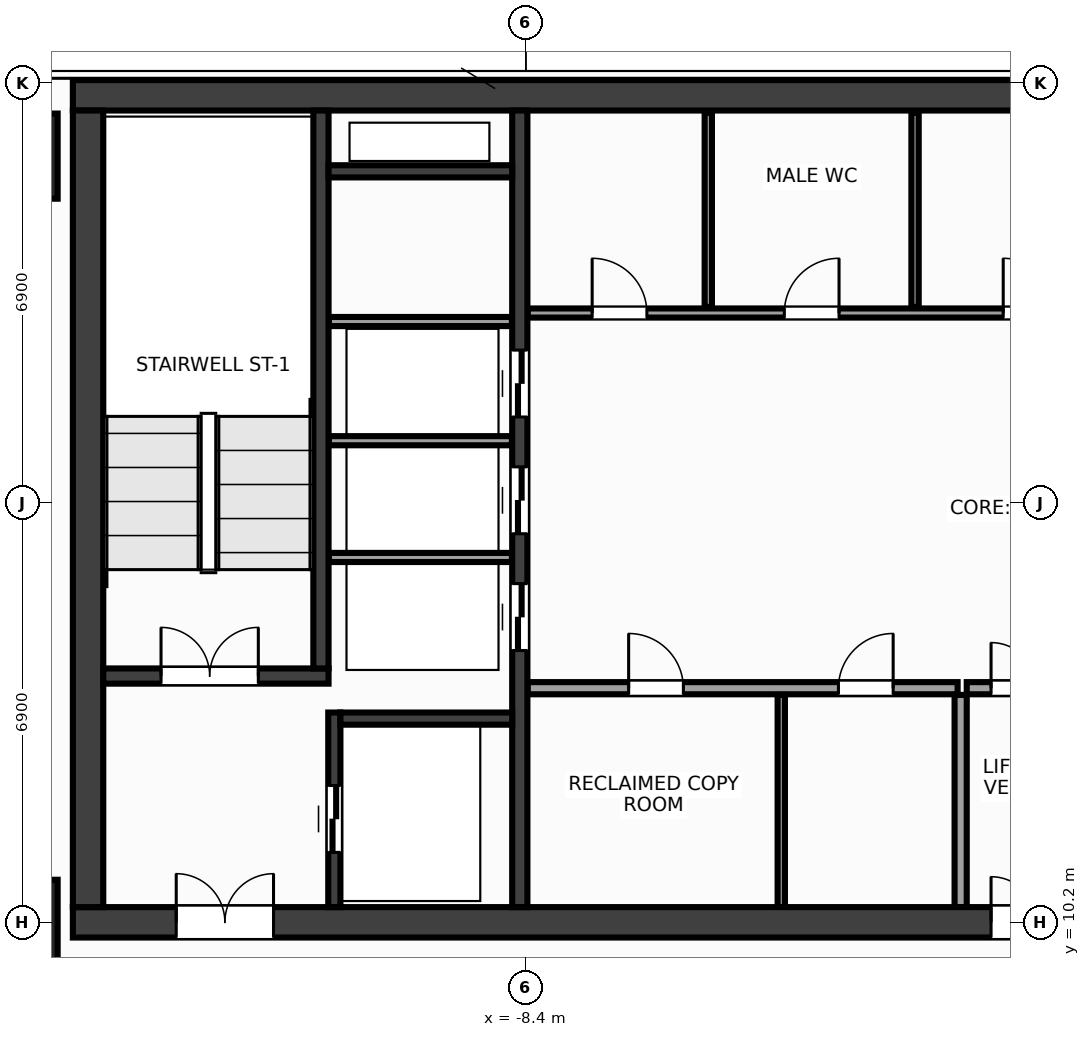
"""IFC4 building model, lengths in metres.
Left out: names, types, materials, properties, quantities, classifications, styles, units other than length and angle.
Written with IfcOpenShell. Run it as: python <this file> out.ifc"""

import sys

from ifc_helpers import new_model, si_unit, direction, frame, frame_2d, origin, origin_2d, place, context, subcontext, project, spatial, rectangle, extrude, source, transform, mapped, element, fill, save


model = new_model("IFC4")
c1 = context("Model", 3, precision=1e-05, world=origin(), true_north=direction((0.0, 1.0)))
c2 = subcontext(c1, "Body", "Model", "MODEL_VIEW")
j1 = project(units=[si_unit("LENGTHUNIT", "METRE"), si_unit("PLANEANGLEUNIT", "RADIAN")], contexts=[c1])
p1 = place(None, origin())
s1 = spatial("IfcSite", under=j1, at=p1, CompositionType="ELEMENT")
p2 = place(p1, origin())
s2 = spatial("IfcBuilding", under=s1, at=p2, CompositionType="ELEMENT")
p3 = place(p2, frame((0.0, 0.0, 236.0)))
s3 = spatial("IfcBuildingStorey", under=s2, at=p3, CompositionType="ELEMENT", Elevation=236.0)
m1 = source(origin(), c2, "Body", "SweptSolid", [
    extrude(rectangle(XDim=31.7, YDim=0.5, at=frame_2d((15.85, 0.0))), origin(), (0.0, 0.0, 1.0), 3.6),
])
p4 = place(p3, frame((-15.85, 23.8, 0.0), z_axis=(0.0, 0.0, 1.0), x_axis=(1.0, 0.0, 0.0)))
e1 = element("IfcWall", 1, at=p4, inside=s3, PredefinedType="SHEAR", context=c2, shape_type="MappedRepresentation", body=[
    mapped(m1, transform((0.0, 0.0, 0.0), x_axis=(1.0, 0.0, 0.0), y_axis=(0.0, 1.0, 0.0), z_axis=(0.0, 0.0, 1.0), scale=1.0)),
])
p5 = place(p3, frame((-15.85, 10.2, 0.0), z_axis=(0.0, 0.0, 1.0), x_axis=(1.0, 0.0, 0.0)))
e2 = element("IfcWall", 2, at=p5, inside=s3, PredefinedType="SHEAR", context=c2, shape_type="MappedRepresentation", body=[
    mapped(m1, transform((0.0, 0.0, 0.0), x_axis=(1.0, 0.0, 0.0), y_axis=(0.0, 1.0, 0.0), z_axis=(0.0, 0.0, 1.0), scale=1.0)),
])
p6 = place(p5, frame((1.7, 0.0, 0.0)))
e3 = element("IfcOpeningElement", 3, at=p6, cuts=e2, PredefinedType="OPENING", context=c2, shape_type="SweptSolid", body=[
    extrude(rectangle(XDim=1.6, YDim=2.15, at=frame_2d((0.8, 1.075))), frame((0.0, 0.262, 0.0), z_axis=(0.0, -1.0, 0.0), x_axis=(1.0, 0.0, 0.0)), (0.0, 0.0, 1.0), 0.524),
])
p7 = place(p5, frame((28.4, 0.0, 0.0)))
e4 = element("IfcOpeningElement", 4, at=p7, cuts=e2, PredefinedType="OPENING", context=c2, shape_type="SweptSolid", body=[
    extrude(rectangle(XDim=1.6, YDim=2.15, at=frame_2d((0.8, 1.075))), frame((0.0, 0.262, 0.0), z_axis=(0.0, -1.0, 0.0), x_axis=(1.0, 0.0, 0.0)), (0.0, 0.0, 1.0), 0.524),
])
p8 = place(p5, frame((15.1, 0.0, 0.0)))
e5 = element("IfcOpeningElement", 5, at=p8, cuts=e2, PredefinedType="OPENING", context=c2, shape_type="SweptSolid", body=[
    extrude(rectangle(XDim=1.5, YDim=2.2, at=frame_2d((0.75, 1.1))), frame((0.0, 0.262, 0.0), z_axis=(0.0, -1.0, 0.0), x_axis=(1.0, 0.0, 0.0)), (0.0, 0.0, 1.0), 0.524),
])
m2 = source(origin(), c2, "Body", "SweptSolid", [
    extrude(rectangle(XDim=13.1, YDim=0.5, at=frame_2d((6.55, 0.0))), origin(), (0.0, 0.0, 1.0), 3.6),
])
p9 = place(p3, frame((-15.6, 10.45, 0.0), z_axis=(0.0, 0.0, 1.0), x_axis=(0.0, 1.0, 0.0)))
e6 = element("IfcWall", 6, at=p9, inside=s3, PredefinedType="SHEAR", context=c2, shape_type="MappedRepresentation", body=[
    mapped(m2, transform((0.0, 0.0, 0.0), x_axis=(1.0, 0.0, 0.0), y_axis=(0.0, 1.0, 0.0), z_axis=(0.0, 0.0, 1.0), scale=1.0)),
])
m3 = source(origin(), c2, "Body", "SweptSolid", [
    extrude(rectangle(XDim=13.1, YDim=0.25, at=frame_2d((6.55, 0.0))), origin(), (0.0, 0.0, 1.0), 3.6),
])
p10 = place(p3, frame((-8.5, 10.45, 0.0), z_axis=(0.0, 0.0, 1.0), x_axis=(0.0, 1.0, 0.0)))
e7 = element("IfcWall", 7, at=p10, inside=s3, PredefinedType="SHEAR", context=c2, shape_type="MappedRepresentation", body=[
    mapped(m3, transform((0.0, 0.0, 0.0), x_axis=(1.0, 0.0, 0.0), y_axis=(0.0, 1.0, 0.0), z_axis=(0.0, 0.0, 1.0), scale=1.0)),
])
p11 = place(p10, frame((4.22, 0.0, 0.0)))
e8 = element("IfcOpeningElement", 8, at=p11, cuts=e7, PredefinedType="OPENING", context=c2, shape_type="SweptSolid", body=[
    extrude(rectangle(XDim=1.1, YDim=2.15, at=frame_2d((0.55, 1.075))), frame((0.0, 0.137, 0.0), z_axis=(0.0, -1.0, 0.0), x_axis=(1.0, 0.0, 0.0)), (0.0, 0.0, 1.0), 0.274),
])
p12 = place(p10, frame((6.14, 0.0, 0.0)))
e9 = element("IfcOpeningElement", 9, at=p12, cuts=e7, PredefinedType="OPENING", context=c2, shape_type="SweptSolid", body=[
    extrude(rectangle(XDim=1.1, YDim=2.15, at=frame_2d((0.55, 1.075))), frame((0.0, 0.137, 0.0), z_axis=(0.0, -1.0, 0.0), x_axis=(1.0, 0.0, 0.0)), (0.0, 0.0, 1.0), 0.274),
])
p13 = place(p10, frame((8.06, 0.0, 0.0)))
e10 = element("IfcOpeningElement", 10, at=p13, cuts=e7, PredefinedType="OPENING", context=c2, shape_type="SweptSolid", body=[
    extrude(rectangle(XDim=1.1, YDim=2.15, at=frame_2d((0.55, 1.075))), frame((0.0, 0.137, 0.0), z_axis=(0.0, -1.0, 0.0), x_axis=(1.0, 0.0, 0.0)), (0.0, 0.0, 1.0), 0.274),
])
m4 = source(origin(), c2, "Body", "SweptSolid", [
    extrude(rectangle(XDim=3.705, YDim=0.25, at=frame_2d((1.853, 0.0))), origin(), (0.0, 0.0, 1.0), 3.6),
])
p14 = place(p3, frame((-15.35, 14.25, 0.0), z_axis=(0.0, 0.0, 1.0), x_axis=(1.0, 0.0, 0.0)))
e11 = element("IfcWall", 11, at=p14, inside=s3, PredefinedType="SHEAR", context=c2, shape_type="MappedRepresentation", body=[
    mapped(m4, transform((0.0, 0.0, 0.0), x_axis=(1.0, 0.0, 0.0), y_axis=(0.0, 1.0, 0.0), z_axis=(0.0, 0.0, 1.0), scale=1.0)),
])
p15 = place(p14, frame((0.95, 0.0, 0.0)))
e12 = element("IfcOpeningElement", 12, at=p15, cuts=e11, PredefinedType="OPENING", context=c2, shape_type="SweptSolid", body=[
    extrude(rectangle(XDim=1.6, YDim=2.15, at=frame_2d((0.8, 1.075))), frame((0.0, 0.137, 0.0), z_axis=(0.0, -1.0, 0.0), x_axis=(1.0, 0.0, 0.0)), (0.0, 0.0, 1.0), 0.274),
])
m5 = source(origin(), c2, "Body", "SweptSolid", [
    extrude(rectangle(XDim=9.175, YDim=0.25, at=frame_2d((4.587, 0.0))), origin(), (0.0, 0.0, 1.0), 3.6),
])
p16 = place(p3, frame((-11.77, 14.375, 0.0), z_axis=(0.0, 0.0, 1.0), x_axis=(0.0, 1.0, 0.0)))
e13 = element("IfcWall", 13, at=p16, inside=s3, PredefinedType="SHEAR", context=c2, shape_type="MappedRepresentation", body=[
    mapped(m5, transform((0.0, 0.0, 0.0), x_axis=(1.0, 0.0, 0.0), y_axis=(0.0, 1.0, 0.0), z_axis=(0.0, 0.0, 1.0), scale=1.0)),
])
m6 = source(origin(), c2, "Body", "SweptSolid", [
    extrude(rectangle(XDim=3.2, YDim=0.2, at=frame_2d((1.6, 0.0))), origin(), (0.0, 0.0, 1.0), 3.6),
])
p17 = place(p3, frame((-11.55, 10.45, 0.0), z_axis=(0.0, 0.0, 1.0), x_axis=(0.0, 1.0, 0.0)))
e14 = element("IfcWall", 14, at=p17, inside=s3, PredefinedType="SHEAR", context=c2, shape_type="MappedRepresentation", body=[
    mapped(m6, transform((0.0, 0.0, 0.0), x_axis=(1.0, 0.0, 0.0), y_axis=(0.0, 1.0, 0.0), z_axis=(0.0, 0.0, 1.0), scale=1.0)),
])
p18 = place(p17, frame((0.9, 0.0, 0.0)))
e15 = element("IfcOpeningElement", 15, at=p18, cuts=e14, PredefinedType="OPENING", context=c2, shape_type="SweptSolid", body=[
    extrude(rectangle(XDim=1.1, YDim=2.15, at=frame_2d((0.55, 1.075))), frame((0.0, 0.112, 0.0), z_axis=(0.0, -1.0, 0.0), x_axis=(1.0, 0.0, 0.0)), (0.0, 0.0, 1.0), 0.224),
])
m7 = source(origin(), c2, "Body", "SweptSolid", [
    extrude(rectangle(XDim=2.825, YDim=0.2, at=frame_2d((1.413, 0.0))), origin(), (0.0, 0.0, 1.0), 3.6),
])
p19 = place(p3, frame((-11.45, 13.55, 0.0), z_axis=(0.0, 0.0, 1.0), x_axis=(1.0, 0.0, 0.0)))
e16 = element("IfcWall", 16, at=p19, inside=s3, PredefinedType="SHEAR", context=c2, shape_type="MappedRepresentation", body=[
    mapped(m7, transform((0.0, 0.0, 0.0), x_axis=(1.0, 0.0, 0.0), y_axis=(0.0, 1.0, 0.0), z_axis=(0.0, 0.0, 1.0), scale=1.0)),
])
m8 = source(origin(), c2, "Body", "SweptSolid", [
    extrude(rectangle(XDim=3.02, YDim=0.2, at=frame_2d((1.51, 0.0))), origin(), (0.0, 0.0, 1.0), 3.6),
])
p20 = place(p3, frame((-11.645, 22.55, 0.0), z_axis=(0.0, 0.0, 1.0), x_axis=(1.0, 0.0, 0.0)))
e17 = element("IfcWall", 17, at=p20, inside=s3, PredefinedType="SHEAR", context=c2, shape_type="MappedRepresentation", body=[
    mapped(m8, transform((0.0, 0.0, 0.0), x_axis=(1.0, 0.0, 0.0), y_axis=(0.0, 1.0, 0.0), z_axis=(0.0, 0.0, 1.0), scale=1.0)),
])
m9 = source(origin(), c2, "Body", "SweptSolid", [
    extrude(rectangle(XDim=1.4, YDim=1.4, at=origin_2d()), origin(), (0.0, 0.0, 1.0), 3.6),
])
for number, where, z_axis, x_axis in (
    (18, (-16.8, 10.2, 0.0), (0.0, 0.0, 1.0), (1.0, 0.0, 0.0)),
    (19, (-16.8, 22.8, 0.0), (0.0, 0.0, 1.0), (1.0, 0.0, 0.0)),
):
    element("IfcColumn", number, at=place(p3, frame(where, z_axis=z_axis, x_axis=x_axis)), inside=s3, PredefinedType="COLUMN", context=c2, shape_type="MappedRepresentation", body=[
        mapped(m9, transform((0.0, 0.0, 0.0), x_axis=(1.0, 0.0, 0.0), y_axis=(0.0, 1.0, 0.0), z_axis=(0.0, 0.0, 1.0), scale=1.0)),
    ])
m10 = source(origin(), c2, "Body", "SweptSolid", [
    extrude(rectangle(XDim=3.01, YDim=0.15, at=frame_2d((1.505, 0.0))), origin(), (0.0, 0.0, 1.0), 3.37),
])
for number, where, z_axis, x_axis in (
    (20, (-11.64, 16.2, 0.0), (0.0, 0.0, 1.0), (1.0, 0.0, 0.0)),
    (21, (-11.64, 18.12, 0.0), (0.0, 0.0, 1.0), (1.0, 0.0, 0.0)),
    (22, (-11.64, 20.08, 0.0), (0.0, 0.0, 1.0), (1.0, 0.0, 0.0)),
):
    element("IfcWall", number, at=place(p3, frame(where, z_axis=z_axis, x_axis=x_axis)), inside=s3, PredefinedType="PARTITIONING", context=c2, shape_type="MappedRepresentation", body=[
        mapped(m10, transform((0.0, 0.0, 0.0), x_axis=(1.0, 0.0, 0.0), y_axis=(0.0, 1.0, 0.0), z_axis=(0.0, 0.0, 1.0), scale=1.0)),
    ])
m11 = source(origin(), c2, "Body", "SweptSolid", [
    extrude(rectangle(XDim=7.07, YDim=0.2, at=frame_2d((3.535, 0.0))), origin(), (0.0, 0.0, 1.0), 3.37),
])
p21 = place(p3, frame((-8.37, 14.05, 0.0), z_axis=(0.0, 0.0, 1.0), x_axis=(1.0, 0.0, 0.0)))
e23 = element("IfcWall", 23, at=p21, inside=s3, PredefinedType="PARTITIONING", context=c2, shape_type="MappedRepresentation", body=[
    mapped(m11, transform((0.0, 0.0, 0.0), x_axis=(1.0, 0.0, 0.0), y_axis=(0.0, 1.0, 0.0), z_axis=(0.0, 0.0, 1.0), scale=1.0)),
])
p22 = place(p21, frame((1.66, 0.0, 0.0)))
e24 = element("IfcOpeningElement", 24, at=p22, cuts=e23, PredefinedType="OPENING", context=c2, shape_type="SweptSolid", body=[
    extrude(rectangle(XDim=0.9, YDim=2.15, at=frame_2d((0.45, 1.075))), frame((0.0, 0.112, 0.0), z_axis=(0.0, -1.0, 0.0), x_axis=(1.0, 0.0, 0.0)), (0.0, 0.0, 1.0), 0.224),
])
p23 = place(p21, frame((5.11, 0.0, 0.0)))
e25 = element("IfcOpeningElement", 25, at=p23, cuts=e23, PredefinedType="OPENING", context=c2, shape_type="SweptSolid", body=[
    extrude(rectangle(XDim=0.9, YDim=2.15, at=frame_2d((0.45, 1.075))), frame((0.0, 0.112, 0.0), z_axis=(0.0, -1.0, 0.0), x_axis=(1.0, 0.0, 0.0)), (0.0, 0.0, 1.0), 0.224),
])
m12 = source(origin(), c2, "Body", "SweptSolid", [
    extrude(rectangle(XDim=3.49, YDim=0.2, at=frame_2d((1.745, 0.0))), origin(), (0.0, 0.0, 1.0), 3.37),
])
p24 = place(p3, frame((-1.25, 10.45, 0.0), z_axis=(0.0, 0.0, 1.0), x_axis=(0.0, 1.0, 0.0)))
e26 = element("IfcWall", 26, at=p24, inside=s3, PredefinedType="PARTITIONING", context=c2, shape_type="MappedRepresentation", body=[
    mapped(m12, transform((0.0, 0.0, 0.0), x_axis=(1.0, 0.0, 0.0), y_axis=(0.0, 1.0, 0.0), z_axis=(0.0, 0.0, 1.0), scale=1.0)),
])
m13 = source(origin(), c2, "Body", "SweptSolid", [
    extrude(rectangle(XDim=2.3, YDim=0.2, at=frame_2d((1.15, 0.0))), origin(), (0.0, 0.0, 1.0), 3.37),
])
p25 = place(p3, frame((-1.15, 14.05, 0.0), z_axis=(0.0, 0.0, 1.0), x_axis=(1.0, 0.0, 0.0)))
e27 = element("IfcWall", 27, at=p25, inside=s3, PredefinedType="PARTITIONING", context=c2, shape_type="MappedRepresentation", body=[
    mapped(m13, transform((0.0, 0.0, 0.0), x_axis=(1.0, 0.0, 0.0), y_axis=(0.0, 1.0, 0.0), z_axis=(0.0, 0.0, 1.0), scale=1.0)),
])
p26 = place(p25, frame((0.4, 0.0, 0.0)))
e28 = element("IfcOpeningElement", 28, at=p26, cuts=e27, PredefinedType="OPENING", context=c2, shape_type="SweptSolid", body=[
    extrude(rectangle(XDim=1.5, YDim=2.2, at=frame_2d((0.75, 1.1))), frame((0.0, 0.112, 0.0), z_axis=(0.0, -1.0, 0.0), x_axis=(1.0, 0.0, 0.0)), (0.0, 0.0, 1.0), 0.224),
])
m14 = source(origin(), c2, "Body", "SweptSolid", [
    extrude(rectangle(XDim=14.59, YDim=0.15, at=frame_2d((7.295, 0.0))), origin(), (0.0, 0.0, 1.0), 3.37),
])
p27 = place(p3, frame((-8.37, 20.22, 0.0), z_axis=(0.0, 0.0, 1.0), x_axis=(1.0, 0.0, 0.0)))
e29 = element("IfcWall", 29, at=p27, inside=s3, PredefinedType="PARTITIONING", context=c2, shape_type="MappedRepresentation", body=[
    mapped(m14, transform((0.0, 0.0, 0.0), x_axis=(1.0, 0.0, 0.0), y_axis=(0.0, 1.0, 0.0), z_axis=(0.0, 0.0, 1.0), scale=1.0)),
])
p28 = place(p27, frame((1.06, 0.0, 0.0)))
e30 = element("IfcOpeningElement", 30, at=p28, cuts=e29, PredefinedType="OPENING", context=c2, shape_type="SweptSolid", body=[
    extrude(rectangle(XDim=0.9, YDim=2.15, at=frame_2d((0.45, 1.075))), frame((0.0, 0.087, 0.0), z_axis=(0.0, -1.0, 0.0), x_axis=(1.0, 0.0, 0.0)), (0.0, 0.0, 1.0), 0.174),
])
p29 = place(p27, frame((4.22, 0.0, 0.0)))
e31 = element("IfcOpeningElement", 31, at=p29, cuts=e29, PredefinedType="OPENING", context=c2, shape_type="SweptSolid", body=[
    extrude(rectangle(XDim=0.9, YDim=2.15, at=frame_2d((0.45, 1.075))), frame((0.0, 0.087, 0.0), z_axis=(0.0, -1.0, 0.0), x_axis=(1.0, 0.0, 0.0)), (0.0, 0.0, 1.0), 0.174),
])
p30 = place(p27, frame((7.82, 0.0, 0.0)))
e32 = element("IfcOpeningElement", 32, at=p30, cuts=e29, PredefinedType="OPENING", context=c2, shape_type="SweptSolid", body=[
    extrude(rectangle(XDim=0.9, YDim=2.15, at=frame_2d((0.45, 1.075))), frame((0.0, 0.087, 0.0), z_axis=(0.0, -1.0, 0.0), x_axis=(1.0, 0.0, 0.0)), (0.0, 0.0, 1.0), 0.174),
])
p31 = place(p27, frame((11.87, 0.0, 0.0)))
e33 = element("IfcOpeningElement", 33, at=p31, cuts=e29, PredefinedType="OPENING", context=c2, shape_type="SweptSolid", body=[
    extrude(rectangle(XDim=0.9, YDim=2.15, at=frame_2d((0.45, 1.075))), frame((0.0, 0.087, 0.0), z_axis=(0.0, -1.0, 0.0), x_axis=(1.0, 0.0, 0.0)), (0.0, 0.0, 1.0), 0.174),
])
m15 = source(origin(), c2, "Body", "SweptSolid", [
    extrude(rectangle(XDim=3.49, YDim=0.12, at=frame_2d((1.745, 0.0))), origin(), (0.0, 0.0, 1.0), 3.37),
])
p32 = place(p3, frame((-4.2, 10.45, 0.0), z_axis=(0.0, 0.0, 1.0), x_axis=(0.0, 1.0, 0.0)))
e34 = element("IfcWall", 34, at=p32, inside=s3, PredefinedType="PARTITIONING", context=c2, shape_type="MappedRepresentation", body=[
    mapped(m15, transform((0.0, 0.0, 0.0), x_axis=(1.0, 0.0, 0.0), y_axis=(0.0, 1.0, 0.0), z_axis=(0.0, 0.0, 1.0), scale=1.0)),
])
m16 = source(origin(), c2, "Body", "SweptSolid", [
    extrude(rectangle(XDim=3.19, YDim=0.12, at=frame_2d((1.595, 0.0))), origin(), (0.0, 0.0, 1.0), 3.37),
])
for number, where, z_axis, x_axis in (
    (35, (-5.4, 20.32, 0.0), (0.0, 0.0, 1.0), (0.0, 1.0, 0.0)),
    (36, (-2.0, 20.32, 0.0), (0.0, 0.0, 1.0), (0.0, 1.0, 0.0)),
):
    element("IfcWall", number, at=place(p3, frame(where, z_axis=z_axis, x_axis=x_axis)), inside=s3, PredefinedType="PARTITIONING", context=c2, shape_type="MappedRepresentation", body=[
        mapped(m16, transform((0.0, 0.0, 0.0), x_axis=(1.0, 0.0, 0.0), y_axis=(0.0, 1.0, 0.0), z_axis=(0.0, 0.0, 1.0), scale=1.0)),
    ])
m17 = source(origin(), c2, "Body", "SweptSolid", [
    extrude(rectangle(XDim=1.6, YDim=2.15, at=frame_2d((0.8, 1.075))), frame((0.0, 0.025, 0.0), z_axis=(0.0, -1.0, 0.0), x_axis=(1.0, 0.0, 0.0)), (0.0, 0.0, 1.0), 0.05),
])
p33 = place(p15, origin())
e37 = element("IfcDoor", 37, at=p33, inside=s3, OperationType="DOUBLE_DOOR_SINGLE_SWING", PredefinedType="DOOR", context=c2, shape_type="MappedRepresentation", body=[
    mapped(m17, transform((0.0, 0.0, 0.0), x_axis=(1.0, 0.0, 0.0), y_axis=(0.0, 1.0, 0.0), z_axis=(0.0, 0.0, 1.0), scale=1.0)),
])
fill(e12, e37)
p34 = place(p6, origin())
e38 = element("IfcDoor", 38, at=p34, inside=s3, OperationType="DOUBLE_DOOR_SINGLE_SWING", PredefinedType="DOOR", context=c2, shape_type="MappedRepresentation", body=[
    mapped(m17, transform((0.0, 0.0, 0.0), x_axis=(1.0, 0.0, 0.0), y_axis=(0.0, 1.0, 0.0), z_axis=(0.0, 0.0, 1.0), scale=1.0)),
])
fill(e3, e38)
m18 = source(origin(), c2, "Body", "SweptSolid", [
    extrude(rectangle(XDim=1.1, YDim=2.15, at=frame_2d((0.55, 1.075))), frame((0.0, 0.025, 0.0), z_axis=(0.0, -1.0, 0.0), x_axis=(1.0, 0.0, 0.0)), (0.0, 0.0, 1.0), 0.05),
])
p35 = place(p18, origin())
e39 = element("IfcDoor", 39, at=p35, inside=s3, OperationType="DOUBLE_DOOR_SLIDING", PredefinedType="DOOR", context=c2, shape_type="MappedRepresentation", body=[
    mapped(m18, transform((0.0, 0.0, 0.0), x_axis=(1.0, 0.0, 0.0), y_axis=(0.0, 1.0, 0.0), z_axis=(0.0, 0.0, 1.0), scale=1.0)),
])
fill(e15, e39)
p36 = place(p11, origin())
e40 = element("IfcDoor", 40, at=p36, inside=s3, OperationType="DOUBLE_DOOR_SLIDING", PredefinedType="DOOR", context=c2, shape_type="MappedRepresentation", body=[
    mapped(m18, transform((0.0, 0.0, 0.0), x_axis=(1.0, 0.0, 0.0), y_axis=(0.0, 1.0, 0.0), z_axis=(0.0, 0.0, 1.0), scale=1.0)),
])
fill(e8, e40)
p37 = place(p12, origin())
e41 = element("IfcDoor", 41, at=p37, inside=s3, OperationType="DOUBLE_DOOR_SLIDING", PredefinedType="DOOR", context=c2, shape_type="MappedRepresentation", body=[
    mapped(m18, transform((0.0, 0.0, 0.0), x_axis=(1.0, 0.0, 0.0), y_axis=(0.0, 1.0, 0.0), z_axis=(0.0, 0.0, 1.0), scale=1.0)),
])
fill(e9, e41)
p38 = place(p13, origin())
e42 = element("IfcDoor", 42, at=p38, inside=s3, OperationType="DOUBLE_DOOR_SLIDING", PredefinedType="DOOR", context=c2, shape_type="MappedRepresentation", body=[
    mapped(m18, transform((0.0, 0.0, 0.0), x_axis=(1.0, 0.0, 0.0), y_axis=(0.0, 1.0, 0.0), z_axis=(0.0, 0.0, 1.0), scale=1.0)),
])
fill(e10, e42)
m19 = source(origin(), c2, "Body", "SweptSolid", [
    extrude(rectangle(XDim=0.9, YDim=2.15, at=frame_2d((0.45, 1.075))), frame((0.0, 0.025, 0.0), z_axis=(0.0, -1.0, 0.0), x_axis=(1.0, 0.0, 0.0)), (0.0, 0.0, 1.0), 0.05),
])
p39 = place(p22, origin())
e43 = element("IfcDoor", 43, at=p39, inside=s3, OperationType="SINGLE_SWING_LEFT", PredefinedType="DOOR", context=c2, shape_type="MappedRepresentation", body=[
    mapped(m19, transform((0.0, 0.0, 0.0), x_axis=(1.0, 0.0, 0.0), y_axis=(0.0, 1.0, 0.0), z_axis=(0.0, 0.0, 1.0), scale=1.0)),
])
fill(e24, e43)
p40 = place(p23, origin())
e44 = element("IfcDoor", 44, at=p40, inside=s3, OperationType="SINGLE_SWING_RIGHT", PredefinedType="DOOR", context=c2, shape_type="MappedRepresentation", body=[
    mapped(m19, transform((0.0, 0.0, 0.0), x_axis=(1.0, 0.0, 0.0), y_axis=(0.0, 1.0, 0.0), z_axis=(0.0, 0.0, 1.0), scale=1.0)),
])
fill(e25, e44)
m20 = source(origin(), c2, "Body", "SweptSolid", [
    extrude(rectangle(XDim=1.5, YDim=2.2, at=frame_2d((0.75, 1.1))), frame((0.0, 0.025, 0.0), z_axis=(0.0, -1.0, 0.0), x_axis=(1.0, 0.0, 0.0)), (0.0, 0.0, 1.0), 0.05),
])
p41 = place(p26, origin())
e45 = element("IfcDoor", 45, at=p41, inside=s3, OperationType="DOUBLE_DOOR_SINGLE_SWING", PredefinedType="DOOR", context=c2, shape_type="MappedRepresentation", body=[
    mapped(m20, transform((0.0, 0.0, 0.0), x_axis=(1.0, 0.0, 0.0), y_axis=(0.0, 1.0, 0.0), z_axis=(0.0, 0.0, 1.0), scale=1.0)),
])
fill(e28, e45)
p42 = place(p8, origin())
e46 = element("IfcDoor", 46, at=p42, inside=s3, OperationType="DOUBLE_DOOR_SINGLE_SWING", PredefinedType="DOOR", context=c2, shape_type="MappedRepresentation", body=[
    mapped(m20, transform((0.0, 0.0, 0.0), x_axis=(1.0, 0.0, 0.0), y_axis=(0.0, 1.0, 0.0), z_axis=(0.0, 0.0, 1.0), scale=1.0)),
])
fill(e5, e46)
p43 = place(p28, origin())
e47 = element("IfcDoor", 47, at=p43, inside=s3, OperationType="SINGLE_SWING_LEFT", PredefinedType="DOOR", context=c2, shape_type="MappedRepresentation", body=[
    mapped(m19, transform((0.0, 0.0, 0.0), x_axis=(1.0, 0.0, 0.0), y_axis=(0.0, 1.0, 0.0), z_axis=(0.0, 0.0, 1.0), scale=1.0)),
])
fill(e30, e47)
p44 = place(p29, origin())
e48 = element("IfcDoor", 48, at=p44, inside=s3, OperationType="SINGLE_SWING_RIGHT", PredefinedType="DOOR", context=c2, shape_type="MappedRepresentation", body=[
    mapped(m19, transform((0.0, 0.0, 0.0), x_axis=(1.0, 0.0, 0.0), y_axis=(0.0, 1.0, 0.0), z_axis=(0.0, 0.0, 1.0), scale=1.0)),
])
fill(e31, e48)
p45 = place(p30, origin())
e49 = element("IfcDoor", 49, at=p45, inside=s3, OperationType="SINGLE_SWING_LEFT", PredefinedType="DOOR", context=c2, shape_type="MappedRepresentation", body=[
    mapped(m19, transform((0.0, 0.0, 0.0), x_axis=(1.0, 0.0, 0.0), y_axis=(0.0, 1.0, 0.0), z_axis=(0.0, 0.0, 1.0), scale=1.0)),
])
fill(e32, e49)
save(model, sys.argv[1])
